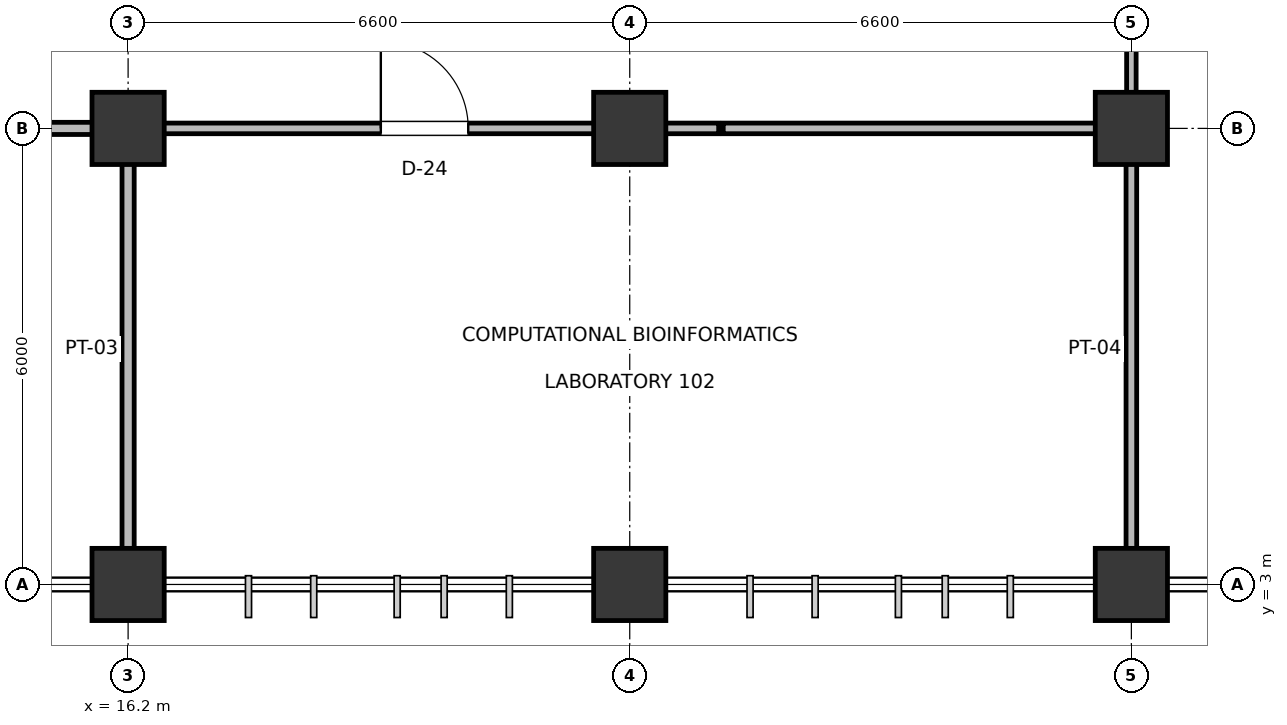
"""IFC4 building model, lengths in metres.
Left out: names, types, materials, properties, quantities, classifications, styles, units other than length and angle.
Written with IfcOpenShell. Run it as: python <this file> out.ifc"""

import sys

from ifc_helpers import new_model, si_unit, direction, frame, frame_2d, origin, origin_2d, place, context, subcontext, project, spatial, rectangle, extrude, element, fill, save


model = new_model("IFC4")
c1 = context("Model", 3, precision=1e-05, world=origin(), true_north=direction((0.0, 1.0)))
c2 = subcontext(c1, "Body", "Model", "MODEL_VIEW")
j1 = project(units=[si_unit("LENGTHUNIT", "METRE"), si_unit("PLANEANGLEUNIT", "RADIAN")], contexts=[c1])
p1 = place(None, origin())
s1 = spatial("IfcSite", under=j1, at=p1, CompositionType="ELEMENT")
p2 = place(p1, origin())
s2 = spatial("IfcBuilding", under=s1, at=p2, CompositionType="ELEMENT")
p3 = place(p2, frame((0.0, 0.0, 5.4)))
s3 = spatial("IfcBuildingStorey", under=s2, at=p3, CompositionType="ELEMENT", Elevation=5.4)
for number, where, z_axis, x_axis in (
    (1, (16.2, 3.0, 0.0), (0.0, 0.0, 1.0), (1.0, 0.0, 0.0)),
    (2, (16.2, 9.0, 0.0), (0.0, 0.0, 1.0), (1.0, 0.0, 0.0)),
    (3, (22.8, 3.0, 0.0), (0.0, 0.0, 1.0), (1.0, 0.0, 0.0)),
    (4, (22.8, 9.0, 0.0), (0.0, 0.0, 1.0), (1.0, 0.0, 0.0)),
    (5, (29.4, 3.0, 0.0), (0.0, 0.0, 1.0), (1.0, 0.0, 0.0)),
    (6, (29.4, 9.0, 0.0), (0.0, 0.0, 1.0), (1.0, 0.0, 0.0)),
):
    element("IfcColumn", number, at=place(p3, frame(where, z_axis=z_axis, x_axis=x_axis)), inside=s3, PredefinedType="COLUMN", context=c2, shape_type="SweptSolid", body=[
        extrude(rectangle(XDim=0.95, YDim=0.95, at=origin_2d()), origin(), (0.0, 0.0, 1.0), 4.8),
    ])
p4 = place(p3, frame((16.2, 3.23, 0.0), z_axis=(0.0, 0.0, 1.0), x_axis=(0.0, 1.0, 0.0)))
e7 = element("IfcWall", 7, at=p4, inside=s3, PredefinedType="PARTITIONING", context=c2, shape_type="SweptSolid", body=[
    extrude(rectangle(XDim=5.74, YDim=0.16, at=frame_2d((2.87, 0.0))), origin(), (0.0, 0.0, 1.0), 3.925),
])
p5 = place(p3, frame((10.83, 9.0, 0.0), z_axis=(0.0, 0.0, 1.0), x_axis=(1.0, 0.0, 0.0)))
e8 = element("IfcWall", 8, at=p5, inside=s3, PredefinedType="PARTITIONING", context=c2, shape_type="SweptSolid", body=[
    extrude(rectangle(XDim=5.34, YDim=0.16, at=frame_2d((2.67, 0.0))), origin(), (0.0, 0.0, 1.0), 3.825),
])
p6 = place(p3, frame((29.4, 3.23, 0.0), z_axis=(0.0, 0.0, 1.0), x_axis=(0.0, 1.0, 0.0)))
e9 = element("IfcWall", 9, at=p6, inside=s3, PredefinedType="PARTITIONING", context=c2, shape_type="SweptSolid", body=[
    extrude(rectangle(XDim=5.74, YDim=0.14, at=frame_2d((2.87, 0.0))), origin(), (0.0, 0.0, 1.0), 3.925),
])
p7 = place(p3, frame((24.03, 9.0, 0.0), z_axis=(0.0, 0.0, 1.0), x_axis=(1.0, 0.0, 0.0)))
e10 = element("IfcWall", 10, at=p7, inside=s3, PredefinedType="PARTITIONING", context=c2, shape_type="SweptSolid", body=[
    extrude(rectangle(XDim=5.34, YDim=0.14, at=frame_2d((2.67, 0.0))), origin(), (0.0, 0.0, 1.0), 3.825),
])
p8 = place(p3, frame((16.23, 9.0, 0.0), z_axis=(0.0, 0.0, 1.0), x_axis=(1.0, 0.0, 0.0)))
e11 = element("IfcWall", 11, at=p8, inside=s3, PredefinedType="PARTITIONING", context=c2, shape_type="SweptSolid", body=[
    extrude(rectangle(XDim=7.74, YDim=0.14, at=frame_2d((3.87, 0.0))), origin(), (0.0, 0.0, 1.0), 3.755),
])
p9 = place(p8, frame((3.295, 0.0, 0.0)))
e12 = element("IfcOpeningElement", 12, at=p9, cuts=e11, PredefinedType="OPENING", context=c2, shape_type="SweptSolid", body=[
    extrude(rectangle(XDim=1.15, YDim=2.15, at=frame_2d((0.575, 1.075))), frame((0.0, 0.08, 0.0), z_axis=(0.0, -1.0, 0.0), x_axis=(1.0, 0.0, 0.0)), (0.0, 0.0, 1.0), 0.16),
])
p10 = place(p3, frame((29.4, 9.03, 0.0), z_axis=(0.0, 0.0, 1.0), x_axis=(0.0, 1.0, 0.0)))
e13 = element("IfcWall", 13, at=p10, inside=s3, PredefinedType="PARTITIONING", context=c2, shape_type="SweptSolid", body=[
    extrude(rectangle(XDim=11.54, YDim=0.125, at=frame_2d((5.77, 0.0))), origin(), (0.0, 0.0, 1.0), 3.725),
])
p11 = place(p10, frame((5.23, 0.0, 0.0)))
e14 = element("IfcOpeningElement", 14, at=p11, cuts=e13, PredefinedType="OPENING", context=c2, shape_type="SweptSolid", body=[
    extrude(rectangle(XDim=1.08, YDim=2.15, at=frame_2d((0.54, 1.075))), frame((0.0, 0.073, 0.0), z_axis=(0.0, -1.0, 0.0), x_axis=(1.0, 0.0, 0.0)), (0.0, 0.0, 1.0), 0.145),
])
p12 = place(p9, origin())
e15 = element("IfcDoor", 15, at=p12, inside=s3, OperationType="SINGLE_SWING_LEFT", PredefinedType="DOOR", context=c2, shape_type="SweptSolid", body=[
    extrude(rectangle(XDim=1.15, YDim=2.15, at=frame_2d((0.575, 1.075))), frame((0.0, 0.025, 0.0), z_axis=(0.0, -1.0, 0.0), x_axis=(1.0, 0.0, 0.0)), (0.0, 0.0, 1.0), 0.05),
])
fill(e12, e15)
save(model, sys.argv[1])
